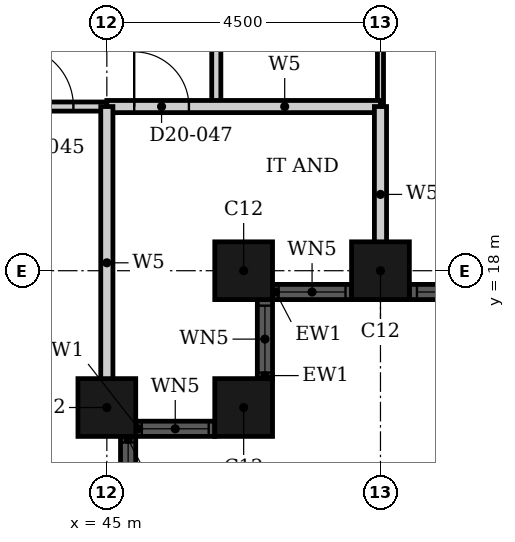
"""IFC4 building model, lengths in metres.
Left out: names, types, materials, properties, quantities, classifications, styles, units other than length and angle.
Written with IfcOpenShell. Run it as: python <this file> out.ifc"""

import sys

from ifc_helpers import new_model, si_unit, direction, frame, frame_2d, origin, origin_2d, place, context, subcontext, project, spatial, rectangle, hollow_rectangle, extrude, element, fill, save


model = new_model("IFC4")
c1 = context("Model", 3, precision=1e-05, world=origin(), true_north=direction((0.0, 1.0)))
c2 = subcontext(c1, "Body", "Model", "MODEL_VIEW")
j1 = project(units=[si_unit("LENGTHUNIT", "METRE"), si_unit("PLANEANGLEUNIT", "RADIAN")], contexts=[c1])
p1 = place(None, origin())
s1 = spatial("IfcSite", under=j1, at=p1, CompositionType="ELEMENT")
p2 = place(p1, origin())
s2 = spatial("IfcBuilding", under=s1, at=p2, CompositionType="ELEMENT")
p3 = place(p2, frame((0.0, 0.0, 85.2)))
s3 = spatial("IfcBuildingStorey", under=s2, at=p3, CompositionType="ELEMENT", Elevation=85.2)
for number, where, z_axis, x_axis in (
    (1, (45.0, 15.75, 0.0), (0.0, 0.0, 1.0), (1.0, 0.0, 0.0)),
    (2, (47.25, 15.75, 0.0), (0.0, 0.0, 1.0), (1.0, 0.0, 0.0)),
    (3, (47.25, 18.0, 0.0), (0.0, 0.0, 1.0), (1.0, 0.0, 0.0)),
    (4, (49.5, 18.0, 0.0), (0.0, 0.0, 1.0), (1.0, 0.0, 0.0)),
):
    element("IfcColumn", number, at=place(p3, frame(where, z_axis=z_axis, x_axis=x_axis)), inside=s3, PredefinedType="COLUMN", context=c2, shape_type="SweptSolid", body=[
        extrude(hollow_rectangle(XDim=0.95, YDim=0.95, WallThickness=0.03, at=origin_2d()), origin(), (0.0, 0.0, 1.0), 3.6),
    ])
p4 = place(p3, frame((45.35, 13.975, 0.0), z_axis=(0.0, 0.0, 1.0), x_axis=(0.0, 1.0, 0.0)))
e5 = element("IfcWall", 5, at=p4, inside=s3, PredefinedType="SOLIDWALL", context=c2, shape_type="SweptSolid", body=[
    extrude(rectangle(XDim=1.3, YDim=0.25, at=frame_2d((0.65, 0.0))), origin(), (0.0, 0.0, 1.0), 3.6),
])
p5 = place(p4, frame((0.1, 0.0, 0.9)))
e6 = element("IfcOpeningElement", 6, at=p5, cuts=e5, PredefinedType="OPENING", context=c2, shape_type="SweptSolid", body=[
    extrude(rectangle(XDim=1.1, YDim=2.08, at=frame_2d((0.55, 1.04))), frame((0.0, 0.135, 0.0), z_axis=(0.0, -1.0, 0.0), x_axis=(1.0, 0.0, 0.0)), (0.0, 0.0, 1.0), 0.27),
])
p6 = place(p3, frame((45.475, 15.4, 0.0), z_axis=(0.0, 0.0, 1.0), x_axis=(1.0, 0.0, 0.0)))
e7 = element("IfcWall", 7, at=p6, inside=s3, PredefinedType="SOLIDWALL", context=c2, shape_type="SweptSolid", body=[
    extrude(rectangle(XDim=1.3, YDim=0.25, at=frame_2d((0.65, 0.0))), origin(), (0.0, 0.0, 1.0), 3.6),
])
p7 = place(p6, frame((0.1, 0.0, 0.9)))
e8 = element("IfcOpeningElement", 8, at=p7, cuts=e7, PredefinedType="OPENING", context=c2, shape_type="SweptSolid", body=[
    extrude(rectangle(XDim=1.1, YDim=2.08, at=frame_2d((0.55, 1.04))), frame((0.0, 0.135, 0.0), z_axis=(0.0, -1.0, 0.0), x_axis=(1.0, 0.0, 0.0)), (0.0, 0.0, 1.0), 0.27),
])
p8 = place(p3, frame((47.6, 16.225, 0.0), z_axis=(0.0, 0.0, 1.0), x_axis=(0.0, 1.0, 0.0)))
e9 = element("IfcWall", 9, at=p8, inside=s3, PredefinedType="SOLIDWALL", context=c2, shape_type="SweptSolid", body=[
    extrude(rectangle(XDim=1.3, YDim=0.25, at=frame_2d((0.65, 0.0))), origin(), (0.0, 0.0, 1.0), 3.6),
])
p9 = place(p8, frame((0.1, 0.0, 0.9)))
e10 = element("IfcOpeningElement", 10, at=p9, cuts=e9, PredefinedType="OPENING", context=c2, shape_type="SweptSolid", body=[
    extrude(rectangle(XDim=1.1, YDim=2.08, at=frame_2d((0.55, 1.04))), frame((0.0, 0.135, 0.0), z_axis=(0.0, -1.0, 0.0), x_axis=(1.0, 0.0, 0.0)), (0.0, 0.0, 1.0), 0.27),
])
p10 = place(p3, frame((47.725, 17.65, 0.0), z_axis=(0.0, 0.0, 1.0), x_axis=(1.0, 0.0, 0.0)))
e11 = element("IfcWall", 11, at=p10, inside=s3, PredefinedType="SOLIDWALL", context=c2, shape_type="SweptSolid", body=[
    extrude(rectangle(XDim=1.3, YDim=0.25, at=frame_2d((0.65, 0.0))), origin(), (0.0, 0.0, 1.0), 3.6),
])
p11 = place(p10, frame((0.1, 0.0, 0.9)))
e12 = element("IfcOpeningElement", 12, at=p11, cuts=e11, PredefinedType="OPENING", context=c2, shape_type="SweptSolid", body=[
    extrude(rectangle(XDim=1.1, YDim=2.08, at=frame_2d((0.55, 1.04))), frame((0.0, 0.135, 0.0), z_axis=(0.0, -1.0, 0.0), x_axis=(1.0, 0.0, 0.0)), (0.0, 0.0, 1.0), 0.27),
])
p12 = place(p3, frame((49.975, 17.65, 0.0), z_axis=(0.0, 0.0, 1.0), x_axis=(1.0, 0.0, 0.0)))
e13 = element("IfcWall", 13, at=p12, inside=s3, PredefinedType="SOLIDWALL", context=c2, shape_type="SweptSolid", body=[
    extrude(rectangle(XDim=8.05, YDim=0.25, at=frame_2d((4.025, 0.0))), origin(), (0.0, 0.0, 1.0), 3.6),
])
p13 = place(p12, frame((0.125, 0.0, 0.9)))
e14 = element("IfcOpeningElement", 14, at=p13, cuts=e13, PredefinedType="OPENING", context=c2, shape_type="SweptSolid", body=[
    extrude(rectangle(XDim=3.3, YDim=2.08, at=frame_2d((1.65, 1.04))), frame((0.0, 0.135, 0.0), z_axis=(0.0, -1.0, 0.0), x_axis=(1.0, 0.0, 0.0)), (0.0, 0.0, 1.0), 0.27),
])
p14 = place(p12, frame((4.625, 0.0, 0.9)))
e15 = element("IfcOpeningElement", 15, at=p14, cuts=e13, PredefinedType="OPENING", context=c2, shape_type="SweptSolid", body=[
    extrude(rectangle(XDim=3.3, YDim=2.08, at=frame_2d((1.65, 1.04))), frame((0.0, 0.135, 0.0), z_axis=(0.0, -1.0, 0.0), x_axis=(1.0, 0.0, 0.0)), (0.0, 0.0, 1.0), 0.27),
])
p15 = place(p3, frame((31.5, 20.7, 0.0), z_axis=(0.0, 0.0, 1.0), x_axis=(1.0, 0.0, 0.0)))
e16 = element("IfcWall", 16, at=p15, inside=s3, PredefinedType="PARTITIONING", context=c2, shape_type="SweptSolid", body=[
    extrude(rectangle(XDim=13.5, YDim=0.15, at=frame_2d((6.75, 0.0))), origin(), (0.0, 0.0, 1.0), 3.3),
])
p16 = place(p15, frame((11.95, 0.0, 0.0)))
e17 = element("IfcOpeningElement", 17, at=p16, cuts=e16, PredefinedType="OPENING", context=c2, shape_type="SweptSolid", body=[
    extrude(rectangle(XDim=1.0, YDim=2.1, at=frame_2d((0.5, 1.05))), frame((0.0, 0.085, 0.0), z_axis=(0.0, -1.0, 0.0), x_axis=(1.0, 0.0, 0.0)), (0.0, 0.0, 1.0), 0.17),
])
p17 = place(p15, frame((1.05, 0.0, 0.0)))
e18 = element("IfcOpeningElement", 18, at=p17, cuts=e16, PredefinedType="OPENING", context=c2, shape_type="SweptSolid", body=[
    extrude(rectangle(XDim=0.9, YDim=2.1, at=frame_2d((0.45, 1.05))), frame((0.0, 0.085, 0.0), z_axis=(0.0, -1.0, 0.0), x_axis=(1.0, 0.0, 0.0)), (0.0, 0.0, 1.0), 0.17),
])
p18 = place(p15, frame((5.55, 0.0, 0.0)))
e19 = element("IfcOpeningElement", 19, at=p18, cuts=e16, PredefinedType="OPENING", context=c2, shape_type="SweptSolid", body=[
    extrude(rectangle(XDim=0.9, YDim=2.1, at=frame_2d((0.45, 1.05))), frame((0.0, 0.085, 0.0), z_axis=(0.0, -1.0, 0.0), x_axis=(1.0, 0.0, 0.0)), (0.0, 0.0, 1.0), 0.17),
])
p19 = place(p3, frame((46.8, 20.7, 0.0), z_axis=(0.0, 0.0, 1.0), x_axis=(0.0, 1.0, 0.0)))
e20 = element("IfcWall", 20, at=p19, inside=s3, PredefinedType="PARTITIONING", context=c2, shape_type="SweptSolid", body=[
    extrude(rectangle(XDim=6.3, YDim=0.15, at=frame_2d((3.15, 0.0))), origin(), (0.0, 0.0, 1.0), 3.3),
])
p20 = place(p19, frame((2.65, 0.0, 0.0)))
e21 = element("IfcOpeningElement", 21, at=p20, cuts=e20, PredefinedType="OPENING", context=c2, shape_type="SweptSolid", body=[
    extrude(rectangle(XDim=0.9, YDim=2.1, at=frame_2d((0.45, 1.05))), frame((0.0, 0.085, 0.0), z_axis=(0.0, -1.0, 0.0), x_axis=(1.0, 0.0, 0.0)), (0.0, 0.0, 1.0), 0.17),
])
p21 = place(p3, frame((49.5, 20.7, 0.0), z_axis=(0.0, 0.0, 1.0), x_axis=(0.0, 1.0, 0.0)))
e22 = element("IfcWall", 22, at=p21, inside=s3, PredefinedType="PARTITIONING", context=c2, shape_type="SweptSolid", body=[
    extrude(rectangle(XDim=6.3, YDim=0.1, at=frame_2d((3.15, 0.0))), origin(), (0.0, 0.0, 1.0), 2.38),
])
p22 = place(p3, frame((45.0, 20.7, 0.0), z_axis=(0.0, 0.0, 1.0), x_axis=(1.0, 0.0, 0.0)))
e23 = element("IfcWall", 23, at=p22, inside=s3, PredefinedType="PARTITIONING", context=c2, shape_type="SweptSolid", body=[
    extrude(rectangle(XDim=4.5, YDim=0.2, at=frame_2d((2.25, 0.0))), origin(), (0.0, 0.0, 1.0), 3.3),
])
p23 = place(p22, frame((0.45, 0.0, 0.0)))
e24 = element("IfcOpeningElement", 24, at=p23, cuts=e23, PredefinedType="OPENING", context=c2, shape_type="SweptSolid", body=[
    extrude(rectangle(XDim=0.9, YDim=2.1, at=frame_2d((0.45, 1.05))), frame((0.0, 0.11, 0.0), z_axis=(0.0, -1.0, 0.0), x_axis=(1.0, 0.0, 0.0)), (0.0, 0.0, 1.0), 0.22),
])
p24 = place(p3, frame((45.0, 15.56, 0.0), z_axis=(0.0, 0.0, 1.0), x_axis=(0.0, 1.0, 0.0)))
e25 = element("IfcWall", 25, at=p24, inside=s3, PredefinedType="PARTITIONING", context=c2, shape_type="SweptSolid", body=[
    extrude(rectangle(XDim=5.14, YDim=0.2, at=frame_2d((2.57, 0.0))), origin(), (0.0, 0.0, 1.0), 3.3),
])
p25 = place(p3, frame((49.5, 17.81, 0.0), z_axis=(0.0, 0.0, 1.0), x_axis=(0.0, 1.0, 0.0)))
e26 = element("IfcWall", 26, at=p25, inside=s3, PredefinedType="PARTITIONING", context=c2, shape_type="SweptSolid", body=[
    extrude(rectangle(XDim=2.89, YDim=0.2, at=frame_2d((1.445, 0.0))), origin(), (0.0, 0.0, 1.0), 2.38),
])
p26 = place(p5, origin())
e27 = element("IfcWindow", 27, at=p26, inside=s3, PartitioningType="SINGLE_PANEL", PredefinedType="WINDOW", context=c2, shape_type="SweptSolid", body=[
    extrude(rectangle(XDim=1.1, YDim=2.08, at=frame_2d((0.55, 1.04))), frame((0.0, 0.03, 0.0), z_axis=(0.0, -1.0, 0.0), x_axis=(1.0, 0.0, 0.0)), (0.0, 0.0, 1.0), 0.06),
])
fill(e6, e27)
p27 = place(p7, origin())
e28 = element("IfcWindow", 28, at=p27, inside=s3, PartitioningType="SINGLE_PANEL", PredefinedType="WINDOW", context=c2, shape_type="SweptSolid", body=[
    extrude(rectangle(XDim=1.1, YDim=2.08, at=frame_2d((0.55, 1.04))), frame((0.0, 0.03, 0.0), z_axis=(0.0, -1.0, 0.0), x_axis=(1.0, 0.0, 0.0)), (0.0, 0.0, 1.0), 0.06),
])
fill(e8, e28)
p28 = place(p9, origin())
e29 = element("IfcWindow", 29, at=p28, inside=s3, PartitioningType="SINGLE_PANEL", PredefinedType="WINDOW", context=c2, shape_type="SweptSolid", body=[
    extrude(rectangle(XDim=1.1, YDim=2.08, at=frame_2d((0.55, 1.04))), frame((0.0, 0.03, 0.0), z_axis=(0.0, -1.0, 0.0), x_axis=(1.0, 0.0, 0.0)), (0.0, 0.0, 1.0), 0.06),
])
fill(e10, e29)
p29 = place(p11, origin())
e30 = element("IfcWindow", 30, at=p29, inside=s3, PartitioningType="SINGLE_PANEL", PredefinedType="WINDOW", context=c2, shape_type="SweptSolid", body=[
    extrude(rectangle(XDim=1.1, YDim=2.08, at=frame_2d((0.55, 1.04))), frame((0.0, 0.03, 0.0), z_axis=(0.0, -1.0, 0.0), x_axis=(1.0, 0.0, 0.0)), (0.0, 0.0, 1.0), 0.06),
])
fill(e12, e30)
p30 = place(p13, origin())
e31 = element("IfcWindow", 31, at=p30, inside=s3, PartitioningType="SINGLE_PANEL", PredefinedType="WINDOW", context=c2, shape_type="SweptSolid", body=[
    extrude(rectangle(XDim=3.3, YDim=2.08, at=frame_2d((1.65, 1.04))), frame((0.0, 0.03, 0.0), z_axis=(0.0, -1.0, 0.0), x_axis=(1.0, 0.0, 0.0)), (0.0, 0.0, 1.0), 0.06),
])
fill(e14, e31)
p31 = place(p16, origin())
e32 = element("IfcDoor", 32, at=p31, inside=s3, OperationType="SINGLE_SWING_RIGHT", PredefinedType="DOOR", context=c2, shape_type="SweptSolid", body=[
    extrude(rectangle(XDim=1.0, YDim=2.1, at=frame_2d((0.5, 1.05))), frame((0.0, 0.025, 0.0), z_axis=(0.0, -1.0, 0.0), x_axis=(1.0, 0.0, 0.0)), (0.0, 0.0, 1.0), 0.05),
])
fill(e17, e32)
p32 = place(p23, origin())
e33 = element("IfcDoor", 33, at=p32, inside=s3, OperationType="SINGLE_SWING_LEFT", PredefinedType="DOOR", context=c2, shape_type="SweptSolid", body=[
    extrude(rectangle(XDim=0.9, YDim=2.1, at=frame_2d((0.45, 1.05))), frame((0.0, 0.025, 0.0), z_axis=(0.0, -1.0, 0.0), x_axis=(1.0, 0.0, 0.0)), (0.0, 0.0, 1.0), 0.05),
])
fill(e24, e33)
save(model, sys.argv[1])
